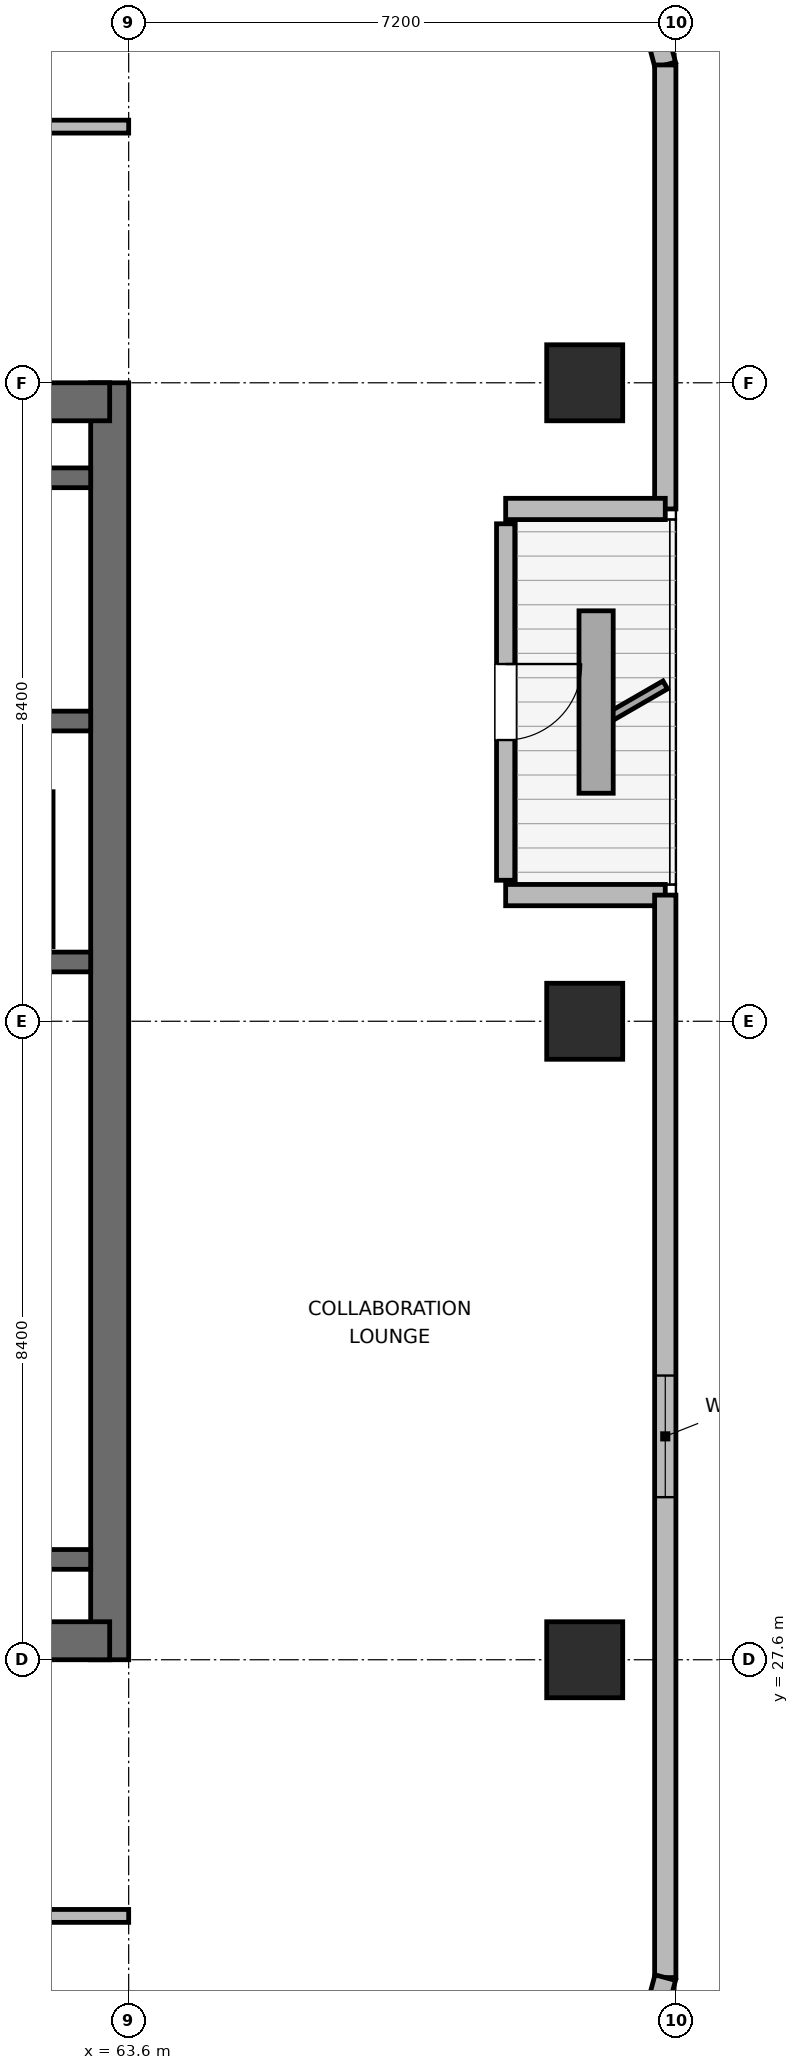
"""IFC4 building model, lengths in metres.
Left out: names, types, materials, properties, quantities, classifications, styles, units other than length and angle.
Written with IfcOpenShell. Run it as: python <this file> out.ifc"""

import sys

from ifc_helpers import new_model, si_unit, direction, frame, frame_2d, origin, origin_2d, place, context, subcontext, project, spatial, rectangle, extrude, element, fill, save


model = new_model("IFC4")
c1 = context("Model", 3, precision=1e-05, world=origin(), true_north=direction((0.0, 1.0)))
c2 = subcontext(c1, "Body", "Model", "MODEL_VIEW")
j1 = project(units=[si_unit("LENGTHUNIT", "METRE"), si_unit("PLANEANGLEUNIT", "RADIAN")], contexts=[c1])
p1 = place(None, origin())
s1 = spatial("IfcSite", under=j1, at=p1, CompositionType="ELEMENT")
p2 = place(p1, origin())
s2 = spatial("IfcBuilding", under=s1, at=p2, CompositionType="ELEMENT")
p3 = place(p2, frame((0.0, 0.0, 290.1)))
s3 = spatial("IfcBuildingStorey", under=s2, at=p3, CompositionType="ELEMENT", Elevation=290.1)
p4 = place(p3, frame((63.35, 27.6, 0.0), z_axis=(0.0, 0.0, 1.0), x_axis=(0.0, 1.0, 0.0)))
e1 = element("IfcWall", 1, at=p4, inside=s3, PredefinedType="SHEAR", context=c2, shape_type="SweptSolid", body=[
    extrude(rectangle(XDim=16.8, YDim=0.5, at=frame_2d((8.4, 0.0))), origin(), (0.0, 0.0, 1.0), 3.9),
])
p5 = place(p3, frame((53.85, 27.85, 0.0), z_axis=(0.0, 0.0, 1.0), x_axis=(1.0, 0.0, 0.0)))
e2 = element("IfcWall", 2, at=p5, inside=s3, PredefinedType="SHEAR", context=c2, shape_type="SweptSolid", body=[
    extrude(rectangle(XDim=9.5, YDim=0.5, at=frame_2d((4.75, 0.0))), origin(), (0.0, 0.0, 1.0), 3.9),
])
p6 = place(p5, frame((4.025, 0.0, 0.0)))
e3 = element("IfcOpeningElement", 3, at=p6, cuts=e2, PredefinedType="OPENING", context=c2, shape_type="SweptSolid", body=[
    extrude(rectangle(XDim=1.05, YDim=2.04, at=frame_2d((0.525, 1.02))), frame((0.0, 0.26, 0.0), z_axis=(0.0, -1.0, 0.0), x_axis=(1.0, 0.0, 0.0)), (0.0, 0.0, 1.0), 0.52),
])
p7 = place(p3, frame((53.85, 44.15, 0.0), z_axis=(0.0, 0.0, 1.0), x_axis=(1.0, 0.0, 0.0)))
e4 = element("IfcWall", 4, at=p7, inside=s3, PredefinedType="SHEAR", context=c2, shape_type="SweptSolid", body=[
    extrude(rectangle(XDim=9.5, YDim=0.5, at=frame_2d((4.75, 0.0))), origin(), (0.0, 0.0, 1.0), 3.9),
])
for number, where, z_axis, x_axis in (
    (5, (58.89, 28.92, 0.0), (0.0, 0.0, 1.0), (1.0, 0.0, 0.0)),
    (6, (58.89, 36.78, 0.0), (0.0, 0.0, 1.0), (1.0, 0.0, 0.0)),
):
    element("IfcWall", number, at=place(p3, frame(where, z_axis=z_axis, x_axis=x_axis)), inside=s3, PredefinedType="SHEAR", context=c2, shape_type="SweptSolid", body=[
        extrude(rectangle(XDim=4.21, YDim=0.26, at=frame_2d((2.105, 0.0))), origin(), (0.0, 0.0, 1.0), 3.9),
    ])
p8 = place(p3, frame((54.1, 39.95, 0.0), z_axis=(0.0, 0.0, 1.0), x_axis=(1.0, 0.0, 0.0)))
e7 = element("IfcWall", 7, at=p8, inside=s3, PredefinedType="SHEAR", context=c2, shape_type="SweptSolid", body=[
    extrude(rectangle(XDim=9.0, YDim=0.26, at=frame_2d((4.5, 0.0))), origin(), (0.0, 0.0, 1.0), 3.9),
])
p9 = place(p8, frame((1.1, 0.0, 0.0)))
e8 = element("IfcOpeningElement", 8, at=p9, cuts=e7, PredefinedType="OPENING", context=c2, shape_type="SweptSolid", body=[
    extrude(rectangle(XDim=1.0, YDim=2.04, at=frame_2d((0.5, 1.02))), frame((0.0, 0.14, 0.0), z_axis=(0.0, -1.0, 0.0), x_axis=(1.0, 0.0, 0.0)), (0.0, 0.0, 1.0), 0.28),
])
p10 = place(p3, frame((54.1, 43.15, 0.0), z_axis=(0.0, 0.0, 1.0), x_axis=(1.0, 0.0, 0.0)))
e9 = element("IfcWall", 9, at=p10, inside=s3, PredefinedType="SHEAR", context=c2, shape_type="SweptSolid", body=[
    extrude(rectangle(XDim=9.0, YDim=0.26, at=frame_2d((4.5, 0.0))), origin(), (0.0, 0.0, 1.0), 3.9),
])
for number, where, z_axis, x_axis in (
    (10, (69.6, 27.6, 0.0), (0.0, 0.0, 1.0), (1.0, 0.0, 0.0)),
    (11, (69.6, 36.0, 0.0), (0.0, 0.0, 1.0), (1.0, 0.0, 0.0)),
    (12, (69.6, 44.4, 0.0), (0.0, 0.0, 1.0), (1.0, 0.0, 0.0)),
):
    element("IfcColumn", number, at=place(p3, frame(where, z_axis=z_axis, x_axis=x_axis)), inside=s3, PredefinedType="COLUMN", context=c2, shape_type="SweptSolid", body=[
        extrude(rectangle(XDim=1.0, YDim=1.0, at=origin_2d()), origin(), (0.0, 0.0, 1.0), 3.9),
    ])
p11 = place(p3, frame((70.031, 50.927, 0.0), z_axis=(0.0, 0.0, 1.0), x_axis=(0.258751159445, -0.965944013639, 0.0)))
e13 = element("IfcWall", 13, at=p11, inside=s3, PredefinedType="SOLIDWALL", context=c2, shape_type="SweptSolid", body=[
    extrude(rectangle(XDim=2.429, YDim=0.28, at=frame_2d((1.214, 0.0))), origin(), (0.0, 0.0, 1.0), 3.68),
])
p12 = place(p3, frame((70.66, 48.582, 0.0), z_axis=(0.0, 0.0, 1.0), x_axis=(0.0, -1.0, 0.0)))
e14 = element("IfcWall", 14, at=p12, inside=s3, PredefinedType="SOLIDWALL", context=c2, shape_type="SweptSolid", body=[
    extrude(rectangle(XDim=5.842, YDim=0.28, at=frame_2d((2.921, 0.0))), origin(), (0.0, 0.0, 1.0), 3.68),
])
p13 = place(p3, frame((70.66, 42.74, 0.0), z_axis=(0.0, 0.0, 1.0), x_axis=(-1.0, 0.0, 0.0)))
e15 = element("IfcWall", 15, at=p13, inside=s3, PredefinedType="SOLIDWALL", context=c2, shape_type="SweptSolid", body=[
    extrude(rectangle(XDim=2.1, YDim=0.28, at=frame_2d((1.05, 0.0))), origin(), (0.0, 0.0, 1.0), 3.126),
])
p14 = place(p3, frame((68.56, 42.545, 0.0), z_axis=(0.0, 0.0, 1.0), x_axis=(0.0, -1.0, 0.0)))
e16 = element("IfcWall", 16, at=p14, inside=s3, PredefinedType="SOLIDWALL", context=c2, shape_type="SweptSolid", body=[
    extrude(rectangle(XDim=4.69, YDim=0.24, at=frame_2d((2.345, 0.0))), origin(), (0.0, 0.0, 1.0), 3.311),
])
p15 = place(p14, frame((1.845, 0.0, 0.0)))
e17 = element("IfcOpeningElement", 17, at=p15, cuts=e16, PredefinedType="OPENING", context=c2, shape_type="SweptSolid", body=[
    extrude(rectangle(XDim=1.0, YDim=2.02, at=frame_2d((0.5, 1.01))), frame((0.0, 0.13, 0.0), z_axis=(0.0, -1.0, 0.0), x_axis=(1.0, 0.0, 0.0)), (0.0, 0.0, 1.0), 0.26),
])
p16 = place(p3, frame((68.56, 37.66, 0.0), z_axis=(0.0, 0.0, 1.0), x_axis=(1.0, 0.0, 0.0)))
e18 = element("IfcWall", 18, at=p16, inside=s3, PredefinedType="SOLIDWALL", context=c2, shape_type="SweptSolid", body=[
    extrude(rectangle(XDim=2.1, YDim=0.28, at=frame_2d((1.05, 0.0))), origin(), (0.0, 0.0, 1.0), 3.126),
])
p17 = place(p3, frame((70.66, 37.66, 0.0), z_axis=(0.0, 0.0, 1.0), x_axis=(0.0, -1.0, 0.0)))
e19 = element("IfcWall", 19, at=p17, inside=s3, PredefinedType="SOLIDWALL", context=c2, shape_type="SweptSolid", body=[
    extrude(rectangle(XDim=14.241, YDim=0.28, at=frame_2d((7.121, 0.0))), origin(), (0.0, 0.0, 1.0), 3.68),
])
p18 = place(p17, frame((6.321, 0.0, 0.85)))
e20 = element("IfcOpeningElement", 20, at=p18, cuts=e19, PredefinedType="OPENING", context=c2, shape_type="SweptSolid", body=[
    extrude(rectangle(XDim=1.6, YDim=1.0, at=frame_2d((0.8, 0.5))), frame((0.0, 0.15, 0.0), z_axis=(0.0, -1.0, 0.0), x_axis=(1.0, 0.0, 0.0)), (0.0, 0.0, 1.0), 0.3),
])
p19 = place(p3, frame((70.66, 23.418, 0.0), z_axis=(0.0, 0.0, 1.0), x_axis=(-0.258751159445, -0.965944013639, 0.0)))
e21 = element("IfcWall", 21, at=p19, inside=s3, PredefinedType="SOLIDWALL", context=c2, shape_type="SweptSolid", body=[
    extrude(rectangle(XDim=2.429, YDim=0.28, at=frame_2d((1.214, 0.0))), origin(), (0.0, 0.0, 1.0), 3.68),
])
p20 = place(p3, frame((62.5, 36.98, 0.0), z_axis=(0.0, 0.0, 1.0), x_axis=(0.0, 1.0, 0.0)))
e22 = element("IfcWall", 22, at=p20, inside=s3, PredefinedType="PARTITIONING", context=c2, shape_type="SweptSolid", body=[
    extrude(rectangle(XDim=2.04, YDim=0.21, at=frame_2d((1.02, 0.0))), origin(), (0.0, 0.0, 1.0), 3.68),
])
p21 = place(p3, frame((29.25, 24.23, 0.0), z_axis=(0.0, 0.0, 1.0), x_axis=(1.0, 0.0, 0.0)))
e23 = element("IfcWall", 23, at=p21, inside=s3, PredefinedType="PARTITIONING", context=c2, shape_type="SweptSolid", body=[
    extrude(rectangle(XDim=34.35, YDim=0.17, at=frame_2d((17.175, 0.0))), origin(), (0.0, 0.0, 1.0), 3.68),
])
p22 = place(p21, frame((5.9, 0.0, 0.0)))
e24 = element("IfcOpeningElement", 24, at=p22, cuts=e23, PredefinedType="OPENING", context=c2, shape_type="SweptSolid", body=[
    extrude(rectangle(XDim=0.95, YDim=2.04, at=frame_2d((0.475, 1.02))), frame((0.0, 0.095, 0.0), z_axis=(0.0, -1.0, 0.0), x_axis=(1.0, 0.0, 0.0)), (0.0, 0.0, 1.0), 0.19),
])
p23 = place(p21, frame((23.075, 0.0, 0.0)))
e25 = element("IfcOpeningElement", 25, at=p23, cuts=e23, PredefinedType="OPENING", context=c2, shape_type="SweptSolid", body=[
    extrude(rectangle(XDim=0.95, YDim=2.04, at=frame_2d((0.475, 1.02))), frame((0.0, 0.095, 0.0), z_axis=(0.0, -1.0, 0.0), x_axis=(1.0, 0.0, 0.0)), (0.0, 0.0, 1.0), 0.19),
])
p24 = place(p3, frame((29.25, 47.77, 0.0), z_axis=(0.0, 0.0, 1.0), x_axis=(1.0, 0.0, 0.0)))
e26 = element("IfcWall", 26, at=p24, inside=s3, PredefinedType="PARTITIONING", context=c2, shape_type="SweptSolid", body=[
    extrude(rectangle(XDim=34.35, YDim=0.17, at=frame_2d((17.175, 0.0))), origin(), (0.0, 0.0, 1.0), 3.68),
])
p25 = place(p24, frame((8.4, 0.0, 0.0)))
e27 = element("IfcOpeningElement", 27, at=p25, cuts=e26, PredefinedType="OPENING", context=c2, shape_type="SweptSolid", body=[
    extrude(rectangle(XDim=0.95, YDim=2.04, at=frame_2d((0.475, 1.02))), frame((0.0, 0.095, 0.0), z_axis=(0.0, -1.0, 0.0), x_axis=(1.0, 0.0, 0.0)), (0.0, 0.0, 1.0), 0.19),
])
p26 = place(p24, frame((25.575, 0.0, 0.0)))
e28 = element("IfcOpeningElement", 28, at=p26, cuts=e26, PredefinedType="OPENING", context=c2, shape_type="SweptSolid", body=[
    extrude(rectangle(XDim=0.95, YDim=2.04, at=frame_2d((0.475, 1.02))), frame((0.0, 0.095, 0.0), z_axis=(0.0, -1.0, 0.0), x_axis=(1.0, 0.0, 0.0)), (0.0, 0.0, 1.0), 0.19),
])
p27 = place(p15, origin())
e29 = element("IfcDoor", 29, at=p27, inside=s3, OperationType="SINGLE_SWING_LEFT", PredefinedType="DOOR", context=c2, shape_type="SweptSolid", body=[
    extrude(rectangle(XDim=1.0, YDim=2.02, at=frame_2d((0.5, 1.01))), frame((0.0, 0.025, 0.0), z_axis=(0.0, -1.0, 0.0), x_axis=(1.0, 0.0, 0.0)), (0.0, 0.0, 1.0), 0.05),
])
fill(e17, e29)
p28 = place(p18, origin())
e30 = element("IfcWindow", 30, at=p28, inside=s3, PartitioningType="SINGLE_PANEL", PredefinedType="WINDOW", context=c2, shape_type="SweptSolid", body=[
    extrude(rectangle(XDim=1.6, YDim=1.0, at=frame_2d((0.8, 0.5))), frame((0.0, 0.03, 0.0), z_axis=(0.0, -1.0, 0.0), x_axis=(1.0, 0.0, 0.0)), (0.0, 0.0, 1.0), 0.06),
])
fill(e20, e30)
save(model, sys.argv[1])
